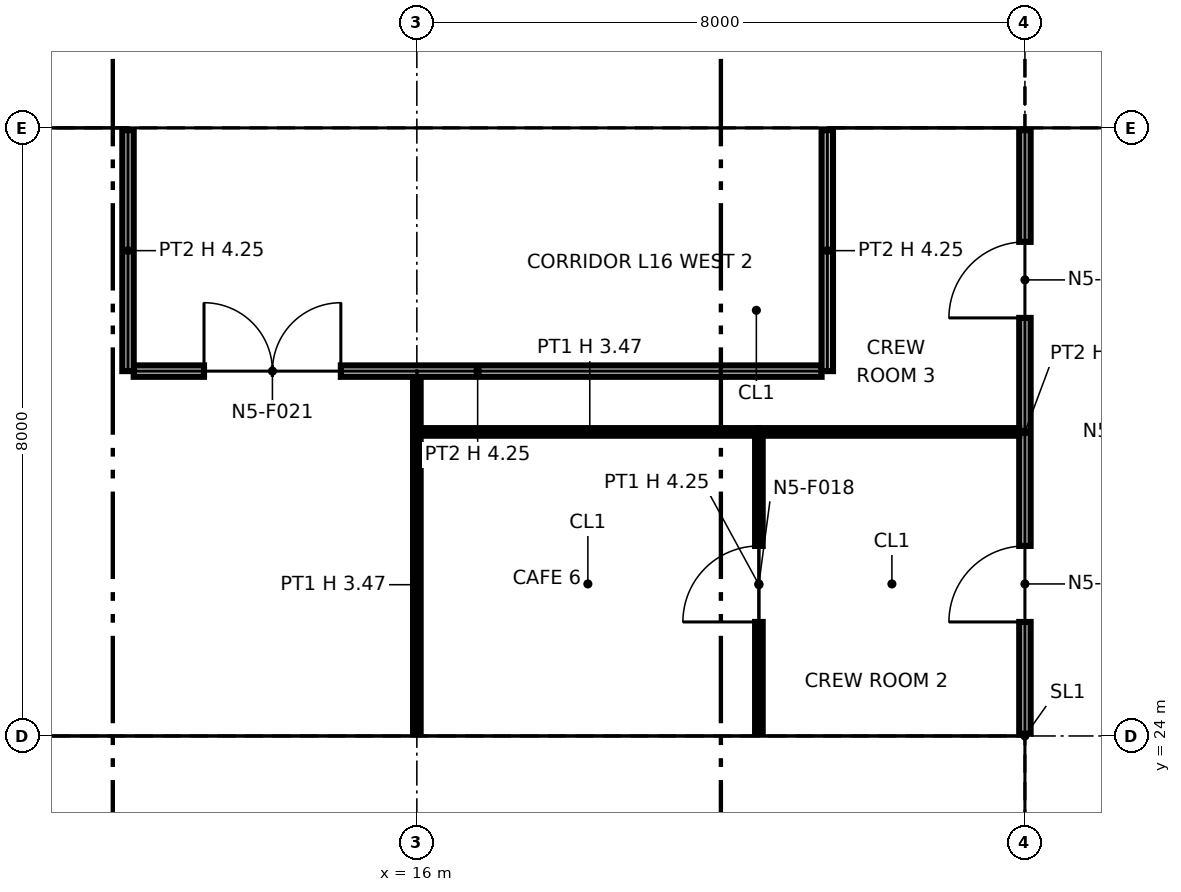
"""IFC4 building model, lengths in metres.
Left out: names, types, materials, properties, quantities, classifications, styles, units other than length and angle.
Written with IfcOpenShell. Run it as: python <this file> out.ifc"""

import sys

from ifc_helpers import new_model, si_unit, direction, frame, frame_2d, origin, origin_2d, place, context, subcontext, project, spatial, polyline, rectangle, i_section, outline, extrude, element, fill, save


model = new_model("IFC4")
c1 = context("Model", 3, precision=1e-05, world=origin(), true_north=direction((0.0, 1.0)))
c2 = subcontext(c1, "Body", "Model", "MODEL_VIEW")
j1 = project(units=[si_unit("LENGTHUNIT", "METRE"), si_unit("PLANEANGLEUNIT", "RADIAN")], contexts=[c1])
p1 = place(None, origin())
s1 = spatial("IfcSite", under=j1, at=p1, CompositionType="ELEMENT")
p2 = place(p1, origin())
s2 = spatial("IfcBuilding", under=s1, at=p2, CompositionType="ELEMENT")
p3 = place(p2, frame((0.0, 0.0, 87.6)))
s3 = spatial("IfcBuildingStorey", under=s2, at=p3, CompositionType="ELEMENT", Elevation=87.6)
p4 = place(p3, frame((16.0, 24.0, 0.0), z_axis=(0.0, 0.0, 1.0), x_axis=(1.0, 0.0, 0.0)))
e1 = element("IfcColumn", 1, at=p4, inside=s3, PredefinedType="COLUMN", context=c2, shape_type="SweptSolid", body=[
    extrude(i_section(OverallWidth=0.411, OverallDepth=0.434, WebThickness=0.036, FlangeThickness=0.057, at=origin_2d()), origin(), (0.0, 0.0, 1.0), 4.25),
])
p5 = place(p3, frame((16.0, 32.0, 0.0), z_axis=(0.0, 0.0, 1.0), x_axis=(1.0, 0.0, 0.0)))
e2 = element("IfcColumn", 2, at=p5, inside=s3, PredefinedType="COLUMN", context=c2, shape_type="SweptSolid", body=[
    extrude(i_section(OverallWidth=0.394, OverallDepth=0.376, WebThickness=0.017, FlangeThickness=0.028, at=origin_2d()), origin(), (0.0, 0.0, 1.0), 4.25),
])
p6 = place(p3, frame((24.0, 24.0, 0.0), z_axis=(0.0, 0.0, 1.0), x_axis=(1.0, 0.0, 0.0)))
e3 = element("IfcColumn", 3, at=p6, inside=s3, PredefinedType="COLUMN", context=c2, shape_type="SweptSolid", body=[
    extrude(i_section(OverallWidth=0.411, OverallDepth=0.434, WebThickness=0.036, FlangeThickness=0.057, at=origin_2d()), origin(), (0.0, 0.0, 1.0), 4.25),
])
p7 = place(p3, frame((24.0, 32.0, 0.0), z_axis=(0.0, 0.0, 1.0), x_axis=(1.0, 0.0, 0.0)))
e4 = element("IfcColumn", 4, at=p7, inside=s3, PredefinedType="COLUMN", context=c2, shape_type="SweptSolid", body=[
    extrude(i_section(OverallWidth=0.399, OverallDepth=0.386, WebThickness=0.021, FlangeThickness=0.033, at=origin_2d()), origin(), (0.0, 0.0, 1.0), 4.25),
])
p8 = place(p3, frame((8.65, 23.25, 0.0), z_axis=(0.0, 0.0, 1.0), x_axis=(1.0, 0.0, 0.0)))
e5 = element("IfcWall", 5, at=p8, inside=s3, PredefinedType="PARTITIONING", context=c2, shape_type="SweptSolid", body=[
    extrude(outline(polyline([(0.0, 0.0), (14.7, 0.0), (14.7, 4.25), (7.469, 4.25), (7.469, 3.632), (7.231, 3.632), (7.23, 4.25), (0.0, 4.25), (0.0, 0.0)])), frame((0.0, 0.1, 0.0), z_axis=(0.0, -1.0, 0.0), x_axis=(1.0, 0.0, 0.0)), (0.0, 0.0, 1.0), 0.2),
])
for number, where, z_axis, x_axis in (
    (6, (11.6, 20.0, 0.0), (0.0, 0.0, 1.0), (0.0, 1.0, 0.0)),
    (7, (14.3, 20.0, 0.0), (0.0, 0.0, 1.0), (0.0, 1.0, 0.0)),
):
    element("IfcWall", number, at=place(p3, frame(where, z_axis=z_axis, x_axis=x_axis)), inside=s3, PredefinedType="PARTITIONING", context=c2, shape_type="SweptSolid", body=[
        extrude(rectangle(XDim=3.15, YDim=0.2, at=frame_2d((1.575, 0.0))), origin(), (0.0, 0.0, 1.0), 4.25),
    ])
for number, where, z_axis, x_axis in (
    (8, (16.875, 20.0, 0.0), (0.0, 0.0, 1.0), (0.0, 1.0, 0.0)),
    (9, (18.825, 20.0, 0.0), (0.0, 0.0, 1.0), (0.0, 1.0, 0.0)),
    (10, (20.775, 20.0, 0.0), (0.0, 0.0, 1.0), (0.0, 1.0, 0.0)),
):
    element("IfcWall", number, at=place(p3, frame(where, z_axis=z_axis, x_axis=x_axis)), inside=s3, PredefinedType="PARTITIONING", context=c2, shape_type="SweptSolid", body=[
        extrude(outline(polyline([(0.0, 0.0), (3.15, 0.0), (3.15, 4.25), (0.082, 4.25), (0.081, 3.789), (0.0, 3.789), (0.0, 0.0)])), frame((0.0, 0.075, 0.0), z_axis=(0.0, -1.0, 0.0), x_axis=(1.0, 0.0, 0.0)), (0.0, 0.0, 1.0), 0.15),
    ])
p9 = place(p3, frame((23.25, 8.85, 0.0), z_axis=(0.0, 0.0, 1.0), x_axis=(0.0, 1.0, 0.0)))
e11 = element("IfcWall", 11, at=p9, inside=s3, PredefinedType="PARTITIONING", context=c2, shape_type="SweptSolid", body=[
    extrude(outline(polyline([(0.0, 0.0), (14.3, 0.0), (14.3, 4.25), (11.231, 4.25), (11.23, 3.789), (11.07, 3.789), (11.069, 4.25), (7.27, 4.25), (7.269, 3.632), (7.031, 3.632), (7.031, 4.25), (1.231, 4.25), (1.23, 3.789), (1.07, 3.789), (1.069, 4.25), (0.0, 4.25), (0.0, 0.0)])), frame((0.0, 0.1, 0.0), z_axis=(0.0, -1.0, 0.0), x_axis=(1.0, 0.0, 0.0)), (0.0, 0.0, 1.0), 0.2),
])
p10 = place(p9, frame((8.3, 0.0, 0.0)))
e12 = element("IfcOpeningElement", 12, at=p10, cuts=e11, PredefinedType="OPENING", context=c2, shape_type="SweptSolid", body=[
    extrude(rectangle(XDim=1.8, YDim=2.1, at=frame_2d((0.9, 1.05))), frame((0.0, 0.11, 0.0), z_axis=(0.0, -1.0, 0.0), x_axis=(1.0, 0.0, 0.0)), (0.0, 0.0, 1.0), 0.22),
])
p11 = place(p3, frame((8.65, 32.75, 0.0), z_axis=(0.0, 0.0, 1.0), x_axis=(1.0, 0.0, 0.0)))
e13 = element("IfcWall", 13, at=p11, inside=s3, PredefinedType="PARTITIONING", context=c2, shape_type="SweptSolid", body=[
    extrude(outline(polyline([(0.0, 0.0), (14.7, 0.0), (14.7, 4.25), (7.469, 4.25), (7.469, 3.632), (7.231, 3.632), (7.23, 4.25), (0.0, 4.25), (0.0, 0.0)])), frame((0.0, 0.1, 0.0), z_axis=(0.0, -1.0, 0.0), x_axis=(1.0, 0.0, 0.0)), (0.0, 0.0, 1.0), 0.2),
])
p12 = place(p11, frame((4.05, 0.0, 0.0)))
e14 = element("IfcOpeningElement", 14, at=p12, cuts=e13, PredefinedType="OPENING", context=c2, shape_type="SweptSolid", body=[
    extrude(rectangle(XDim=1.8, YDim=2.1, at=frame_2d((0.9, 1.05))), frame((0.0, 0.11, 0.0), z_axis=(0.0, -1.0, 0.0), x_axis=(1.0, 0.0, 0.0)), (0.0, 0.0, 1.0), 0.22),
])
p13 = place(p11, frame((8.35, 0.0, 0.0)))
e15 = element("IfcOpeningElement", 15, at=p13, cuts=e13, PredefinedType="OPENING", context=c2, shape_type="SweptSolid", body=[
    extrude(rectangle(XDim=1.4, YDim=2.1, at=frame_2d((0.7, 1.05))), frame((0.0, 0.11, 0.0), z_axis=(0.0, -1.0, 0.0), x_axis=(1.0, 0.0, 0.0)), (0.0, 0.0, 1.0), 0.22),
])
p14 = place(p11, frame((10.85, 0.0, 0.0)))
e16 = element("IfcOpeningElement", 16, at=p14, cuts=e13, PredefinedType="OPENING", context=c2, shape_type="SweptSolid", body=[
    extrude(rectangle(XDim=1.4, YDim=2.1, at=frame_2d((0.7, 1.05))), frame((0.0, 0.11, 0.0), z_axis=(0.0, -1.0, 0.0), x_axis=(1.0, 0.0, 0.0)), (0.0, 0.0, 1.0), 0.22),
])
p15 = place(p3, frame((16.0, 32.85, 0.0), z_axis=(0.0, 0.0, 1.0), x_axis=(0.0, 1.0, 0.0)))
e17 = element("IfcWall", 17, at=p15, inside=s3, PredefinedType="PARTITIONING", context=c2, shape_type="SweptSolid", body=[
    extrude(rectangle(XDim=3.15, YDim=0.6, at=frame_2d((1.575, 0.0))), origin(), (0.0, 0.0, 1.0), 3.632),
])
for number, where, z_axis, x_axis in (
    (18, (19.2, 32.85, 0.0), (0.0, 0.0, 1.0), (0.0, 1.0, 0.0)),
    (19, (23.25, 32.85, 0.0), (0.0, 0.0, 1.0), (0.0, 1.0, 0.0)),
):
    element("IfcWall", number, at=place(p3, frame(where, z_axis=z_axis, x_axis=x_axis)), inside=s3, PredefinedType="PARTITIONING", context=c2, shape_type="SweptSolid", body=[
        extrude(rectangle(XDim=6.3, YDim=0.2, at=frame_2d((3.15, 0.0))), origin(), (0.0, 0.0, 1.0), 4.25),
    ])
p16 = place(p3, frame((24.65, 32.75, 0.0), z_axis=(0.0, 0.0, 1.0), x_axis=(1.0, 0.0, 0.0)))
e20 = element("IfcWall", 20, at=p16, inside=s3, PredefinedType="PARTITIONING", context=c2, shape_type="SweptSolid", body=[
    extrude(outline(polyline([(0.0, 0.0), (14.7, 0.0), (14.7, 4.25), (7.469, 4.25), (7.469, 3.632), (7.231, 3.632), (7.23, 4.25), (0.0, 4.25), (0.0, 0.0)])), frame((0.0, 0.1, 0.0), z_axis=(0.0, -1.0, 0.0), x_axis=(1.0, 0.0, 0.0)), (0.0, 0.0, 1.0), 0.2),
])
p17 = place(p16, frame((4.1, 0.0, 0.0)))
e21 = element("IfcOpeningElement", 21, at=p17, cuts=e20, PredefinedType="OPENING", context=c2, shape_type="SweptSolid", body=[
    extrude(rectangle(XDim=1.8, YDim=2.1, at=frame_2d((0.9, 1.05))), frame((0.0, 0.11, 0.0), z_axis=(0.0, -1.0, 0.0), x_axis=(1.0, 0.0, 0.0)), (0.0, 0.0, 1.0), 0.22),
])
p18 = place(p16, frame((8.55, 0.0, 0.0)))
e22 = element("IfcOpeningElement", 22, at=p18, cuts=e20, PredefinedType="OPENING", context=c2, shape_type="SweptSolid", body=[
    extrude(rectangle(XDim=1.4, YDim=2.1, at=frame_2d((0.7, 1.05))), frame((0.0, 0.11, 0.0), z_axis=(0.0, -1.0, 0.0), x_axis=(1.0, 0.0, 0.0)), (0.0, 0.0, 1.0), 0.22),
])
p19 = place(p16, frame((12.0, 0.0, 0.0)))
e23 = element("IfcOpeningElement", 23, at=p19, cuts=e20, PredefinedType="OPENING", context=c2, shape_type="SweptSolid", body=[
    extrude(rectangle(XDim=1.4, YDim=2.1, at=frame_2d((0.7, 1.05))), frame((0.0, 0.11, 0.0), z_axis=(0.0, -1.0, 0.0), x_axis=(1.0, 0.0, 0.0)), (0.0, 0.0, 1.0), 0.22),
])
p20 = place(p3, frame((24.75, 32.85, 0.0), z_axis=(0.0, 0.0, 1.0), x_axis=(0.0, 1.0, 0.0)))
e24 = element("IfcWall", 24, at=p20, inside=s3, PredefinedType="PARTITIONING", context=c2, shape_type="SweptSolid", body=[
    extrude(outline(polyline([(0.0, 0.0), (6.3, 0.0), (6.3, 4.25), (3.231, 4.25), (3.23, 3.789), (3.07, 3.789), (3.069, 4.25), (0.0, 4.25), (0.0, 0.0)])), frame((0.0, 0.1, 0.0), z_axis=(0.0, -1.0, 0.0), x_axis=(1.0, 0.0, 0.0)), (0.0, 0.0, 1.0), 0.2),
])
p21 = place(p3, frame((16.0, 24.03, 0.0), z_axis=(0.0, 0.0, 1.0), x_axis=(0.0, 1.0, 0.0)))
e25 = element("IfcWall", 25, at=p21, inside=s3, PredefinedType="PARTITIONING", context=c2, shape_type="SweptSolid", body=[
    extrude(rectangle(XDim=3.92, YDim=0.1, at=frame_2d((1.96, 0.0))), origin(), (0.0, 0.0, 1.0), 3.47),
])
p22 = place(p3, frame((20.5, 24.03, 0.0), z_axis=(0.0, 0.0, 1.0), x_axis=(0.0, 1.0, 0.0)))
e26 = element("IfcWall", 26, at=p22, inside=s3, PredefinedType="PARTITIONING", context=c2, shape_type="SweptSolid", body=[
    extrude(rectangle(XDim=3.92, YDim=0.1, at=frame_2d((1.96, 0.0))), origin(), (0.0, 0.0, 1.0), 4.25),
])
p23 = place(p22, frame((1.47, 0.0, 0.0)))
e27 = element("IfcOpeningElement", 27, at=p23, cuts=e26, PredefinedType="OPENING", context=c2, shape_type="SweptSolid", body=[
    extrude(rectangle(XDim=1.0, YDim=2.1, at=frame_2d((0.5, 1.05))), frame((0.0, 0.06, 0.0), z_axis=(0.0, -1.0, 0.0), x_axis=(1.0, 0.0, 0.0)), (0.0, 0.0, 1.0), 0.12),
])
p24 = place(p3, frame((24.0, 24.03, 0.0), z_axis=(0.0, 0.0, 1.0), x_axis=(0.0, 1.0, 0.0)))
e28 = element("IfcWall", 28, at=p24, inside=s3, PredefinedType="PARTITIONING", context=c2, shape_type="SweptSolid", body=[
    extrude(rectangle(XDim=7.94, YDim=0.15, at=frame_2d((3.97, 0.0))), origin(), (0.0, 0.0, 1.0), 3.47),
])
p25 = place(p24, frame((1.47, 0.0, 0.0)))
e29 = element("IfcOpeningElement", 29, at=p25, cuts=e28, PredefinedType="OPENING", context=c2, shape_type="SweptSolid", body=[
    extrude(rectangle(XDim=1.0, YDim=2.1, at=frame_2d((0.5, 1.05))), frame((0.0, 0.085, 0.0), z_axis=(0.0, -1.0, 0.0), x_axis=(1.0, 0.0, 0.0)), (0.0, 0.0, 1.0), 0.17),
])
p26 = place(p24, frame((5.47, 0.0, 0.0)))
e30 = element("IfcOpeningElement", 30, at=p26, cuts=e28, PredefinedType="OPENING", context=c2, shape_type="SweptSolid", body=[
    extrude(rectangle(XDim=1.0, YDim=2.1, at=frame_2d((0.5, 1.05))), frame((0.0, 0.085, 0.0), z_axis=(0.0, -1.0, 0.0), x_axis=(1.0, 0.0, 0.0)), (0.0, 0.0, 1.0), 0.17),
])
p27 = place(p3, frame((16.05, 28.0, 0.0), z_axis=(0.0, 0.0, 1.0), x_axis=(1.0, 0.0, 0.0)))
e31 = element("IfcWall", 31, at=p27, inside=s3, PredefinedType="PARTITIONING", context=c2, shape_type="SweptSolid", body=[
    extrude(rectangle(XDim=4.45, YDim=0.1, at=frame_2d((2.225, 0.0))), origin(), (0.0, 0.0, 1.0), 3.47),
])
p28 = place(p3, frame((16.0, 28.0, 0.0), z_axis=(0.0, 0.0, 1.0), x_axis=(0.0, 1.0, 0.0)))
e32 = element("IfcWall", 32, at=p28, inside=s3, PredefinedType="PARTITIONING", context=c2, shape_type="SweptSolid", body=[
    extrude(rectangle(XDim=0.725, YDim=0.1, at=frame_2d((0.363, 0.0))), origin(), (0.0, 0.0, 1.0), 3.47),
])
p29 = place(p3, frame((20.5, 28.0, 0.0), z_axis=(0.0, 0.0, 1.0), x_axis=(1.0, 0.0, 0.0)))
e33 = element("IfcWall", 33, at=p29, inside=s3, PredefinedType="PARTITIONING", context=c2, shape_type="SweptSolid", body=[
    extrude(rectangle(XDim=3.425, YDim=0.1, at=frame_2d((1.712, 0.0))), origin(), (0.0, 0.0, 1.0), 3.47),
])
p30 = place(p3, frame((12.275, 28.8, 0.0), z_axis=(0.0, 0.0, 1.0), x_axis=(1.0, 0.0, 0.0)))
e34 = element("IfcWall", 34, at=p30, inside=s3, PredefinedType="PARTITIONING", context=c2, shape_type="SweptSolid", body=[
    extrude(rectangle(XDim=9.05, YDim=0.15, at=frame_2d((4.525, 0.0))), origin(), (0.0, 0.0, 1.0), 4.25),
])
p31 = place(p30, frame((0.925, 0.0, 0.0)))
e35 = element("IfcOpeningElement", 35, at=p31, cuts=e34, PredefinedType="OPENING", context=c2, shape_type="SweptSolid", body=[
    extrude(rectangle(XDim=1.8, YDim=2.1, at=frame_2d((0.9, 1.05))), frame((0.0, 0.085, 0.0), z_axis=(0.0, -1.0, 0.0), x_axis=(1.0, 0.0, 0.0)), (0.0, 0.0, 1.0), 0.17),
])
for number, where, z_axis, x_axis in (
    (36, (12.2, 28.8, 0.0), (0.0, 0.0, 1.0), (0.0, 1.0, 0.0)),
    (37, (21.4, 28.8, 0.0), (0.0, 0.0, 1.0), (0.0, 1.0, 0.0)),
):
    element("IfcWall", number, at=place(p3, frame(where, z_axis=z_axis, x_axis=x_axis)), inside=s3, PredefinedType="PARTITIONING", context=c2, shape_type="SweptSolid", body=[
        extrude(rectangle(XDim=3.17, YDim=0.15, at=frame_2d((1.585, 0.0))), origin(), (0.0, 0.0, 1.0), 4.25),
    ])
p32 = place(p12, origin())
e38 = element("IfcDoor", 38, at=p32, inside=s3, OperationType="DOUBLE_DOOR_SINGLE_SWING", PredefinedType="NOTDEFINED", context=c2, shape_type="SweptSolid", body=[
    extrude(rectangle(XDim=1.8, YDim=2.1, at=frame_2d((0.9, 1.05))), frame((0.0, 0.025, 0.0), z_axis=(0.0, -1.0, 0.0), x_axis=(1.0, 0.0, 0.0)), (0.0, 0.0, 1.0), 0.05),
])
fill(e14, e38)
p33 = place(p13, origin())
e39 = element("IfcDoor", 39, at=p33, inside=s3, OperationType="DOUBLE_DOOR_SINGLE_SWING", PredefinedType="NOTDEFINED", context=c2, shape_type="SweptSolid", body=[
    extrude(rectangle(XDim=1.4, YDim=2.1, at=frame_2d((0.7, 1.05))), frame((0.0, 0.025, 0.0), z_axis=(0.0, -1.0, 0.0), x_axis=(1.0, 0.0, 0.0)), (0.0, 0.0, 1.0), 0.05),
])
fill(e15, e39)
p34 = place(p14, origin())
e40 = element("IfcDoor", 40, at=p34, inside=s3, OperationType="DOUBLE_DOOR_SINGLE_SWING", PredefinedType="NOTDEFINED", context=c2, shape_type="SweptSolid", body=[
    extrude(rectangle(XDim=1.4, YDim=2.1, at=frame_2d((0.7, 1.05))), frame((0.0, 0.025, 0.0), z_axis=(0.0, -1.0, 0.0), x_axis=(1.0, 0.0, 0.0)), (0.0, 0.0, 1.0), 0.05),
])
fill(e16, e40)
p35 = place(p25, origin())
e41 = element("IfcDoor", 41, at=p35, inside=s3, OperationType="SINGLE_SWING_LEFT", PredefinedType="DOOR", context=c2, shape_type="SweptSolid", body=[
    extrude(rectangle(XDim=1.0, YDim=2.1, at=frame_2d((0.5, 1.05))), frame((0.0, 0.025, 0.0), z_axis=(0.0, -1.0, 0.0), x_axis=(1.0, 0.0, 0.0)), (0.0, 0.0, 1.0), 0.05),
])
fill(e29, e41)
p36 = place(p23, origin())
e42 = element("IfcDoor", 42, at=p36, inside=s3, OperationType="SINGLE_SWING_LEFT", PredefinedType="DOOR", context=c2, shape_type="SweptSolid", body=[
    extrude(rectangle(XDim=1.0, YDim=2.1, at=frame_2d((0.5, 1.05))), frame((0.0, 0.025, 0.0), z_axis=(0.0, -1.0, 0.0), x_axis=(1.0, 0.0, 0.0)), (0.0, 0.0, 1.0), 0.05),
])
fill(e27, e42)
p37 = place(p26, origin())
e43 = element("IfcDoor", 43, at=p37, inside=s3, OperationType="SINGLE_SWING_LEFT", PredefinedType="DOOR", context=c2, shape_type="SweptSolid", body=[
    extrude(rectangle(XDim=1.0, YDim=2.1, at=frame_2d((0.5, 1.05))), frame((0.0, 0.025, 0.0), z_axis=(0.0, -1.0, 0.0), x_axis=(1.0, 0.0, 0.0)), (0.0, 0.0, 1.0), 0.05),
])
fill(e30, e43)
p38 = place(p31, origin())
e44 = element("IfcDoor", 44, at=p38, inside=s3, OperationType="DOUBLE_DOOR_SINGLE_SWING", PredefinedType="DOOR", context=c2, shape_type="SweptSolid", body=[
    extrude(rectangle(XDim=1.8, YDim=2.1, at=frame_2d((0.9, 1.05))), frame((0.0, 0.025, 0.0), z_axis=(0.0, -1.0, 0.0), x_axis=(1.0, 0.0, 0.0)), (0.0, 0.0, 1.0), 0.05),
])
fill(e35, e44)
save(model, sys.argv[1])
